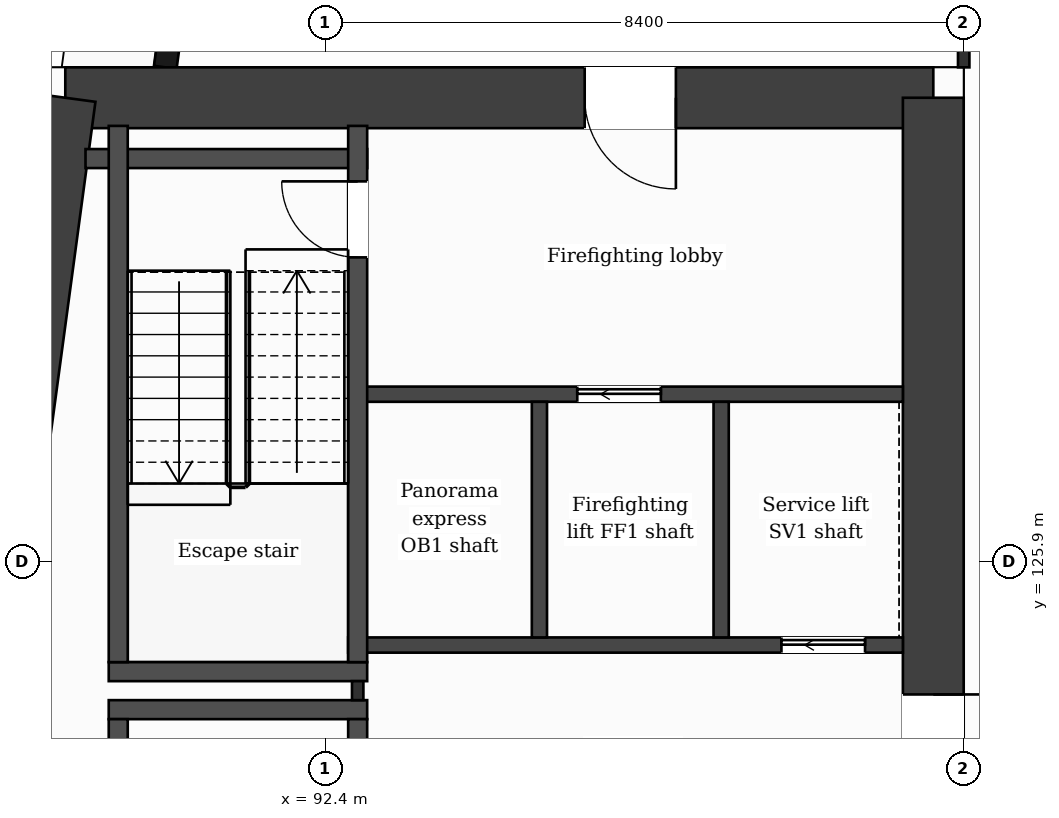
"""IFC4 building model, lengths in metres.
Left out: names, types, materials, properties, quantities, classifications, styles, units other than length and angle.
Written with IfcOpenShell. Run it as: python <this file> out.ifc"""

import sys

from ifc_helpers import new_model, si_unit, direction, frame, frame_2d, origin, place, context, subcontext, project, spatial, rectangle, extrude, element, fill, save


model = new_model("IFC4")
c1 = context("Model", 3, precision=1e-05, world=origin(), true_north=direction((0.0, 1.0)))
c2 = subcontext(c1, "Body", "Model", "MODEL_VIEW")
j1 = project(units=[si_unit("LENGTHUNIT", "METRE"), si_unit("PLANEANGLEUNIT", "RADIAN")], contexts=[c1])
p1 = place(None, origin())
s1 = spatial("IfcSite", under=j1, at=p1, CompositionType="ELEMENT")
p2 = place(p1, origin())
s2 = spatial("IfcBuilding", under=s1, at=p2, CompositionType="ELEMENT")
p3 = place(p2, frame((0.0, 0.0, 205.9)))
s3 = spatial("IfcBuildingStorey", under=s2, at=p3, CompositionType="ELEMENT", Elevation=205.9)
p4 = place(p3, frame((88.98, 132.0, 0.0), z_axis=(0.0, 0.0, 1.0), x_axis=(1.0, 0.0, 0.0)))
e1 = element("IfcWall", 1, at=p4, inside=s3, PredefinedType="SHEAR", context=c2, shape_type="SweptSolid", body=[
    extrude(rectangle(XDim=11.419, YDim=0.8, at=frame_2d((5.71, 0.0))), origin(), (0.0, 0.0, 1.0), 3.7),
])
p5 = place(p4, frame((6.833, 0.0, 0.0)))
e2 = element("IfcOpeningElement", 2, at=p5, cuts=e1, PredefinedType="OPENING", context=c2, shape_type="SweptSolid", body=[
    extrude(rectangle(XDim=1.2, YDim=2.1, at=frame_2d((0.6, 1.05))), frame((0.0, 0.41, 0.0), z_axis=(0.0, -1.0, 0.0), x_axis=(1.0, 0.0, 0.0)), (0.0, 0.0, 1.0), 0.82),
])
p6 = place(p3, frame((100.4, 132.0, 0.0), z_axis=(0.0, 0.0, 1.0), x_axis=(0.0, -1.0, 0.0)))
e3 = element("IfcWall", 3, at=p6, inside=s3, PredefinedType="SHEAR", context=c2, shape_type="SweptSolid", body=[
    extrude(rectangle(XDim=21.2, YDim=0.8, at=frame_2d((10.6, 0.0))), origin(), (0.0, 0.0, 1.0), 3.7),
])
p7 = place(p6, frame((7.85, 0.0, 0.0)))
e4 = element("IfcOpeningElement", 4, at=p7, cuts=e3, PredefinedType="OPENING", context=c2, shape_type="SweptSolid", body=[
    extrude(rectangle(XDim=1.4, YDim=2.1, at=frame_2d((0.7, 1.05))), frame((0.0, 0.41, 0.0), z_axis=(0.0, -1.0, 0.0), x_axis=(1.0, 0.0, 0.0)), (0.0, 0.0, 1.0), 0.82),
])
p8 = place(p3, frame((86.127, 110.8, 0.0), z_axis=(0.0, 0.0, 1.0), x_axis=(0.133408347329, 0.991061154956, 0.0)))
e5 = element("IfcWall", 5, at=p8, inside=s3, PredefinedType="SHEAR", context=c2, shape_type="SweptSolid", body=[
    extrude(rectangle(XDim=21.391, YDim=0.8, at=frame_2d((10.696, 0.0))), origin(), (0.0, 0.0, 1.0), 3.7),
])
p9 = place(p3, frame((91.177, 138.95, 0.0), z_axis=(0.0, 0.0, 1.0), x_axis=(-0.133426664613, -0.991058689065, 0.0)))
e6 = element("IfcWall", 6, at=p9, inside=s3, PredefinedType="SOLIDWALL", context=c2, shape_type="SweptSolid", body=[
    extrude(rectangle(XDim=6.609, YDim=0.3, at=frame_2d((3.305, 0.0))), origin(), (0.0, 0.0, 1.0), 3.38),
])
p10 = place(p9, frame((1.039, 0.0, 0.9)))
e7 = element("IfcOpeningElement", 7, at=p10, cuts=e6, PredefinedType="OPENING", context=c2, shape_type="SweptSolid", body=[
    extrude(rectangle(XDim=1.2, YDim=2.1, at=frame_2d((0.6, 1.05))), frame((0.0, 0.16, 0.0), z_axis=(0.0, -1.0, 0.0), x_axis=(1.0, 0.0, 0.0)), (0.0, 0.0, 1.0), 0.32),
])
p11 = place(p9, frame((4.294, 0.0, 0.0)))
e8 = element("IfcOpeningElement", 8, at=p11, cuts=e6, PredefinedType="OPENING", context=c2, shape_type="SweptSolid", body=[
    extrude(rectangle(XDim=1.2, YDim=2.4, at=frame_2d((0.6, 1.2))), frame((0.0, 0.16, 0.0), z_axis=(0.0, -1.0, 0.0), x_axis=(1.0, 0.0, 0.0)), (0.0, 0.0, 1.0), 0.32),
])
for number, where, z_axis, x_axis in (
    (9, (89.552, 123.95, 0.0), (0.0, 0.0, 1.0), (1.0, 0.0, 0.0)),
    (10, (89.552, 124.45, 0.0), (0.0, 0.0, 1.0), (1.0, 0.0, 0.0)),
):
    element("IfcWall", number, at=place(p3, frame(where, z_axis=z_axis, x_axis=x_axis)), inside=s3, PredefinedType="PARTITIONING", context=c2, shape_type="SweptSolid", body=[
        extrude(rectangle(XDim=3.4, YDim=0.25, at=frame_2d((1.7, 0.0))), origin(), (0.0, 0.0, 1.0), 3.38),
    ])
p12 = place(p3, frame((92.702, 124.8, 0.0), z_axis=(0.0, 0.0, 1.0), x_axis=(1.0, 0.0, 0.0)))
e11 = element("IfcWall", 11, at=p12, inside=s3, PredefinedType="PARTITIONING", context=c2, shape_type="SweptSolid", body=[
    extrude(rectangle(XDim=7.298, YDim=0.2, at=frame_2d((3.649, 0.0))), origin(), (0.0, 0.0, 1.0), 3.38),
])
p13 = place(p12, frame((5.7, 0.0, 0.0)))
e12 = element("IfcOpeningElement", 12, at=p13, cuts=e11, PredefinedType="OPENING", context=c2, shape_type="SweptSolid", body=[
    extrude(rectangle(XDim=1.1, YDim=2.1, at=frame_2d((0.55, 1.05))), frame((0.0, 0.11, 0.0), z_axis=(0.0, -1.0, 0.0), x_axis=(1.0, 0.0, 0.0)), (0.0, 0.0, 1.0), 0.22),
])
p14 = place(p3, frame((92.827, 128.1, 0.0), z_axis=(0.0, 0.0, 1.0), x_axis=(1.0, 0.0, 0.0)))
e13 = element("IfcWall", 13, at=p14, inside=s3, PredefinedType="PARTITIONING", context=c2, shape_type="SweptSolid", body=[
    extrude(rectangle(XDim=7.173, YDim=0.2, at=frame_2d((3.586, 0.0))), origin(), (0.0, 0.0, 1.0), 3.38),
])
p15 = place(p14, frame((2.889, 0.0, 0.0)))
e14 = element("IfcOpeningElement", 14, at=p15, cuts=e13, PredefinedType="OPENING", context=c2, shape_type="SweptSolid", body=[
    extrude(rectangle(XDim=1.1, YDim=2.1, at=frame_2d((0.55, 1.05))), frame((0.0, 0.11, 0.0), z_axis=(0.0, -1.0, 0.0), x_axis=(1.0, 0.0, 0.0)), (0.0, 0.0, 1.0), 0.22),
])
p16 = place(p3, frame((89.246, 131.2, 0.0), z_axis=(0.0, 0.0, 1.0), x_axis=(1.0, 0.0, 0.0)))
e15 = element("IfcWall", 15, at=p16, inside=s3, PredefinedType="PARTITIONING", context=c2, shape_type="SweptSolid", body=[
    extrude(rectangle(XDim=3.706, YDim=0.25, at=frame_2d((1.853, 0.0))), origin(), (0.0, 0.0, 1.0), 3.38),
])
for number, where, z_axis, x_axis in (
    (16, (89.677, 116.77, 0.0), (0.0, 0.0, 1.0), (0.0, 1.0, 0.0)),
    (17, (89.677, 124.575, 0.0), (0.0, 0.0, 1.0), (0.0, 1.0, 0.0)),
):
    element("IfcWall", number, at=place(p3, frame(where, z_axis=z_axis, x_axis=x_axis)), inside=s3, PredefinedType="PARTITIONING", context=c2, shape_type="SweptSolid", body=[
        extrude(rectangle(XDim=7.055, YDim=0.25, at=frame_2d((3.527, 0.0))), origin(), (0.0, 0.0, 1.0), 3.38),
    ])
p17 = place(p3, frame((92.827, 124.075, 0.0), z_axis=(0.0, 0.0, 1.0), x_axis=(0.0, 1.0, 0.0)))
e18 = element("IfcWall", 18, at=p17, inside=s3, PredefinedType="PARTITIONING", context=c2, shape_type="SweptSolid", body=[
    extrude(rectangle(XDim=0.25, YDim=0.15, at=frame_2d((0.125, 0.0))), origin(), (0.0, 0.0, 1.0), 3.38),
])
p18 = place(p3, frame((92.827, 116.77, 0.0), z_axis=(0.0, 0.0, 1.0), x_axis=(0.0, 1.0, 0.0)))
e19 = element("IfcWall", 19, at=p18, inside=s3, PredefinedType="PARTITIONING", context=c2, shape_type="SweptSolid", body=[
    extrude(rectangle(XDim=7.055, YDim=0.25, at=frame_2d((3.527, 0.0))), origin(), (0.0, 0.0, 1.0), 3.38),
])
p19 = place(p18, frame((5.755, 0.0, 0.0)))
e20 = element("IfcOpeningElement", 20, at=p19, cuts=e19, PredefinedType="OPENING", context=c2, shape_type="SweptSolid", body=[
    extrude(rectangle(XDim=0.95, YDim=2.1, at=frame_2d((0.475, 1.05))), frame((0.0, 0.135, 0.0), z_axis=(0.0, -1.0, 0.0), x_axis=(1.0, 0.0, 0.0)), (0.0, 0.0, 1.0), 0.27),
])
p20 = place(p3, frame((92.827, 124.575, 0.0), z_axis=(0.0, 0.0, 1.0), x_axis=(0.0, 1.0, 0.0)))
e21 = element("IfcWall", 21, at=p20, inside=s3, PredefinedType="PARTITIONING", context=c2, shape_type="SweptSolid", body=[
    extrude(rectangle(XDim=7.055, YDim=0.25, at=frame_2d((3.527, 0.0))), origin(), (0.0, 0.0, 1.0), 3.38),
])
p21 = place(p20, frame((5.325, 0.0, 0.0)))
e22 = element("IfcOpeningElement", 22, at=p21, cuts=e21, PredefinedType="OPENING", context=c2, shape_type="SweptSolid", body=[
    extrude(rectangle(XDim=1.0, YDim=2.1, at=frame_2d((0.5, 1.05))), frame((0.0, 0.135, 0.0), z_axis=(0.0, -1.0, 0.0), x_axis=(1.0, 0.0, 0.0)), (0.0, 0.0, 1.0), 0.27),
])
for number, where, z_axis, x_axis in (
    (23, (95.218, 124.9, 0.0), (0.0, 0.0, 1.0), (0.0, 1.0, 0.0)),
    (24, (97.609, 124.9, 0.0), (0.0, 0.0, 1.0), (0.0, 1.0, 0.0)),
):
    element("IfcWall", number, at=place(p3, frame(where, z_axis=z_axis, x_axis=x_axis)), inside=s3, PredefinedType="PARTITIONING", context=c2, shape_type="SweptSolid", body=[
        extrude(rectangle(XDim=3.1, YDim=0.2, at=frame_2d((1.55, 0.0))), origin(), (0.0, 0.0, 1.0), 3.38),
    ])
p22 = place(p3, frame((100.8, 132.4, 0.0), z_axis=(0.0, 0.0, 1.0), x_axis=(0.0, 1.0, 0.0)))
e25 = element("IfcWall", 25, at=p22, inside=s3, PredefinedType="PARTITIONING", context=c2, shape_type="SweptSolid", body=[
    extrude(rectangle(XDim=1.325, YDim=0.15, at=frame_2d((0.663, 0.0))), origin(), (0.0, 0.0, 1.0), 3.38),
])
p23 = place(p15, origin())
e26 = element("IfcDoor", 26, at=p23, inside=s3, OperationType="SLIDING_TO_LEFT", PredefinedType="DOOR", context=c2, shape_type="SweptSolid", body=[
    extrude(rectangle(XDim=1.1, YDim=2.1, at=frame_2d((0.55, 1.05))), frame((0.0, 0.025, 0.0), z_axis=(0.0, -1.0, 0.0), x_axis=(1.0, 0.0, 0.0)), (0.0, 0.0, 1.0), 0.05),
])
fill(e14, e26)
p24 = place(p13, origin())
e27 = element("IfcDoor", 27, at=p24, inside=s3, OperationType="SLIDING_TO_LEFT", PredefinedType="DOOR", context=c2, shape_type="SweptSolid", body=[
    extrude(rectangle(XDim=1.1, YDim=2.1, at=frame_2d((0.55, 1.05))), frame((0.0, 0.025, 0.0), z_axis=(0.0, -1.0, 0.0), x_axis=(1.0, 0.0, 0.0)), (0.0, 0.0, 1.0), 0.05),
])
fill(e12, e27)
p25 = place(p21, origin())
e28 = element("IfcDoor", 28, at=p25, inside=s3, OperationType="SINGLE_SWING_RIGHT", PredefinedType="DOOR", context=c2, shape_type="SweptSolid", body=[
    extrude(rectangle(XDim=1.0, YDim=2.1, at=frame_2d((0.5, 1.05))), frame((0.0, 0.025, 0.0), z_axis=(0.0, -1.0, 0.0), x_axis=(1.0, 0.0, 0.0)), (0.0, 0.0, 1.0), 0.05),
])
fill(e22, e28)
p26 = place(p5, origin())
e29 = element("IfcDoor", 29, at=p26, inside=s3, OperationType="SINGLE_SWING_RIGHT", PredefinedType="DOOR", context=c2, shape_type="SweptSolid", body=[
    extrude(rectangle(XDim=1.2, YDim=2.1, at=frame_2d((0.6, 1.05))), frame((0.0, 0.025, 0.0), z_axis=(0.0, -1.0, 0.0), x_axis=(1.0, 0.0, 0.0)), (0.0, 0.0, 1.0), 0.05),
])
fill(e2, e29)
p27 = place(p7, origin())
e30 = element("IfcDoor", 30, at=p27, inside=s3, OperationType="SINGLE_SWING_LEFT", PredefinedType="DOOR", context=c2, shape_type="SweptSolid", body=[
    extrude(rectangle(XDim=1.4, YDim=2.1, at=frame_2d((0.7, 1.05))), frame((0.0, 0.025, 0.0), z_axis=(0.0, -1.0, 0.0), x_axis=(1.0, 0.0, 0.0)), (0.0, 0.0, 1.0), 0.05),
])
fill(e4, e30)
save(model, sys.argv[1])
